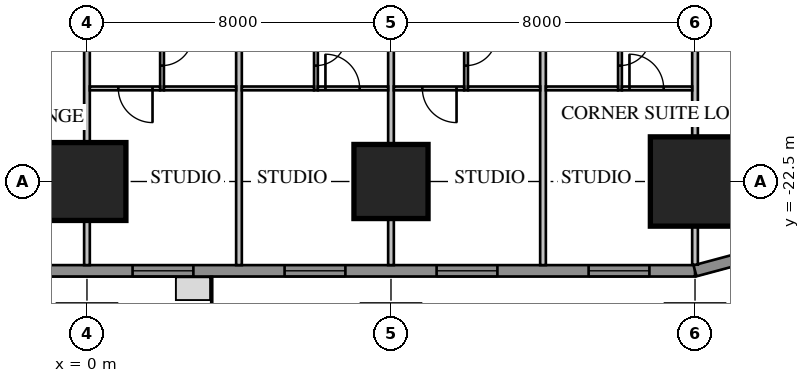
"""IFC4 building model, lengths in metres.
Left out: names, types, materials, properties, quantities, classifications, styles, units other than length and angle.
Written with IfcOpenShell. Run it as: python <this file> out.ifc"""

import sys

from ifc_helpers import new_model, si_unit, direction, frame, frame_2d, origin, origin_2d, place, context, subcontext, project, spatial, rectangle, extrude, element, fill, save


model = new_model("IFC4")
c1 = context("Model", 3, precision=1e-05, world=origin(), true_north=direction((0.0, 1.0)))
c2 = subcontext(c1, "Body", "Model", "MODEL_VIEW")
j1 = project(units=[si_unit("LENGTHUNIT", "METRE"), si_unit("PLANEANGLEUNIT", "RADIAN")], contexts=[c1])
p1 = place(None, origin())
s1 = spatial("IfcSite", under=j1, at=p1, CompositionType="ELEMENT")
p2 = place(p1, origin())
s2 = spatial("IfcBuilding", under=s1, at=p2, CompositionType="ELEMENT")
p3 = place(p2, frame((0.0, 0.0, 35.25)))
s3 = spatial("IfcBuildingStorey", under=s2, at=p3, CompositionType="ELEMENT", Elevation=35.25)
p4 = place(p3, frame((0.0, -22.5, 0.0), z_axis=(0.0, 0.0, 1.0), x_axis=(1.0, 0.0, 0.0)))
e1 = element("IfcColumn", 1, at=p4, inside=s3, PredefinedType="COLUMN", context=c2, shape_type="SweptSolid", body=[
    extrude(rectangle(XDim=2.05, YDim=2.05, at=origin_2d()), origin(), (0.0, 0.0, 1.0), 3.85),
])
p5 = place(p3, frame((8.0, -22.5, 0.0), z_axis=(0.0, 0.0, 1.0), x_axis=(1.0, 0.0, 0.0)))
e2 = element("IfcColumn", 2, at=p5, inside=s3, PredefinedType="COLUMN", context=c2, shape_type="SweptSolid", body=[
    extrude(rectangle(XDim=1.95, YDim=1.95, at=origin_2d()), origin(), (0.0, 0.0, 1.0), 3.85),
])
p6 = place(p3, frame((16.0, -22.5, 0.0), z_axis=(0.0, 0.0, 1.0), x_axis=(1.0, 0.0, 0.0)))
e3 = element("IfcColumn", 3, at=p6, inside=s3, PredefinedType="COLUMN", context=c2, shape_type="SweptSolid", body=[
    extrude(rectangle(XDim=2.35, YDim=2.35, at=origin_2d()), origin(), (0.0, 0.0, 1.0), 3.85),
])
p7 = place(p3, frame((-16.0, -24.85, 0.0), z_axis=(0.0, 0.0, 1.0), x_axis=(1.0, 0.0, 0.0)))
e4 = element("IfcWall", 4, at=p7, inside=s3, PredefinedType="SOLIDWALL", context=c2, shape_type="SweptSolid", body=[
    extrude(rectangle(XDim=32.0, YDim=0.3, at=frame_2d((16.0, 0.0))), origin(), (0.0, 0.0, 1.0), 3.65),
])
p8 = place(p7, frame((1.2, 0.0, 0.75)))
e5 = element("IfcOpeningElement", 5, at=p8, cuts=e4, PredefinedType="OPENING", context=c2, shape_type="SweptSolid", body=[
    extrude(rectangle(XDim=1.6, YDim=1.8, at=frame_2d((0.8, 0.9))), frame((0.0, 0.17, 0.0), z_axis=(0.0, -1.0, 0.0), x_axis=(1.0, 0.0, 0.0)), (0.0, 0.0, 1.0), 0.34),
])
p9 = place(p7, frame((5.2, 0.0, 0.75)))
e6 = element("IfcOpeningElement", 6, at=p9, cuts=e4, PredefinedType="OPENING", context=c2, shape_type="SweptSolid", body=[
    extrude(rectangle(XDim=1.6, YDim=1.8, at=frame_2d((0.8, 0.9))), frame((0.0, 0.17, 0.0), z_axis=(0.0, -1.0, 0.0), x_axis=(1.0, 0.0, 0.0)), (0.0, 0.0, 1.0), 0.34),
])
p10 = place(p7, frame((17.2, 0.0, 0.75)))
e7 = element("IfcOpeningElement", 7, at=p10, cuts=e4, PredefinedType="OPENING", context=c2, shape_type="SweptSolid", body=[
    extrude(rectangle(XDim=1.6, YDim=1.8, at=frame_2d((0.8, 0.9))), frame((0.0, 0.17, 0.0), z_axis=(0.0, -1.0, 0.0), x_axis=(1.0, 0.0, 0.0)), (0.0, 0.0, 1.0), 0.34),
])
p11 = place(p7, frame((21.2, 0.0, 0.75)))
e8 = element("IfcOpeningElement", 8, at=p11, cuts=e4, PredefinedType="OPENING", context=c2, shape_type="SweptSolid", body=[
    extrude(rectangle(XDim=1.6, YDim=1.8, at=frame_2d((0.8, 0.9))), frame((0.0, 0.17, 0.0), z_axis=(0.0, -1.0, 0.0), x_axis=(1.0, 0.0, 0.0)), (0.0, 0.0, 1.0), 0.34),
])
p12 = place(p7, frame((25.2, 0.0, 0.75)))
e9 = element("IfcOpeningElement", 9, at=p12, cuts=e4, PredefinedType="OPENING", context=c2, shape_type="SweptSolid", body=[
    extrude(rectangle(XDim=1.6, YDim=1.8, at=frame_2d((0.8, 0.9))), frame((0.0, 0.17, 0.0), z_axis=(0.0, -1.0, 0.0), x_axis=(1.0, 0.0, 0.0)), (0.0, 0.0, 1.0), 0.34),
])
p13 = place(p7, frame((29.2, 0.0, 0.75)))
e10 = element("IfcOpeningElement", 10, at=p13, cuts=e4, PredefinedType="OPENING", context=c2, shape_type="SweptSolid", body=[
    extrude(rectangle(XDim=1.6, YDim=1.8, at=frame_2d((0.8, 0.9))), frame((0.0, 0.17, 0.0), z_axis=(0.0, -1.0, 0.0), x_axis=(1.0, 0.0, 0.0)), (0.0, 0.0, 1.0), 0.34),
])
p14 = place(p7, frame((8.8, 0.0, 0.75)))
e11 = element("IfcOpeningElement", 11, at=p14, cuts=e4, PredefinedType="OPENING", context=c2, shape_type="SweptSolid", body=[
    extrude(rectangle(XDim=2.4, YDim=1.8, at=frame_2d((1.2, 0.9))), frame((0.0, 0.17, 0.0), z_axis=(0.0, -1.0, 0.0), x_axis=(1.0, 0.0, 0.0)), (0.0, 0.0, 1.0), 0.34),
])
p15 = place(p7, frame((13.812, 0.0, 0.0)))
e12 = element("IfcOpeningElement", 12, at=p15, cuts=e4, PredefinedType="OPENING", context=c2, shape_type="SweptSolid", body=[
    extrude(rectangle(XDim=1.0, YDim=2.4, at=frame_2d((0.5, 1.2))), frame((0.0, 0.17, 0.0), z_axis=(0.0, -1.0, 0.0), x_axis=(1.0, 0.0, 0.0)), (0.0, 0.0, 1.0), 0.34),
])
p16 = place(p3, frame((16.0, -24.85, 0.0), z_axis=(0.0, 0.0, 1.0), x_axis=(0.965920218567, 0.258839972501, 0.0)))
e13 = element("IfcWall", 13, at=p16, inside=s3, PredefinedType="SOLIDWALL", context=c2, shape_type="SweptSolid", body=[
    extrude(rectangle(XDim=4.581, YDim=0.3, at=frame_2d((2.291, 0.0))), origin(), (0.0, 0.0, 1.0), 3.65),
])
p17 = place(p3, frame((0.0, -18.1, 0.0), z_axis=(0.0, 0.0, 1.0), x_axis=(0.0, -1.0, 0.0)))
e14 = element("IfcWall", 14, at=p17, inside=s3, PredefinedType="PARTITIONING", context=c2, shape_type="SweptSolid", body=[
    extrude(rectangle(XDim=6.6, YDim=0.15, at=frame_2d((3.3, 0.0))), origin(), (0.0, 0.0, 1.0), 2.809),
])
for number, where, z_axis, x_axis in (
    (15, (4.0, -18.1, 0.0), (0.0, 0.0, 1.0), (0.0, -1.0, 0.0)),
    (16, (8.0, -18.1, 0.0), (0.0, 0.0, 1.0), (0.0, -1.0, 0.0)),
    (17, (12.0, -18.1, 0.0), (0.0, 0.0, 1.0), (0.0, -1.0, 0.0)),
):
    element("IfcWall", number, at=place(p3, frame(where, z_axis=z_axis, x_axis=x_axis)), inside=s3, PredefinedType="PARTITIONING", context=c2, shape_type="SweptSolid", body=[
        extrude(rectangle(XDim=6.6, YDim=0.15, at=frame_2d((3.3, 0.0))), origin(), (0.0, 0.0, 1.0), 3.65),
    ])
p18 = place(p3, frame((16.0, -18.1, 0.0), z_axis=(0.0, 0.0, 1.0), x_axis=(0.0, -1.0, 0.0)))
e18 = element("IfcWall", 18, at=p18, inside=s3, PredefinedType="PARTITIONING", context=c2, shape_type="SweptSolid", body=[
    extrude(rectangle(XDim=6.589, YDim=0.15, at=frame_2d((3.295, 0.0))), origin(), (0.0, 0.0, 1.0), 3.65),
])
p19 = place(p3, frame((1.975, -18.1, 0.0), z_axis=(0.0, 0.0, 1.0), x_axis=(0.0, -1.0, 0.0)))
e19 = element("IfcWall", 19, at=p19, inside=s3, PredefinedType="PARTITIONING", context=c2, shape_type="SweptSolid", body=[
    extrude(rectangle(XDim=2.0, YDim=0.1, at=frame_2d((1.0, 0.0))), origin(), (0.0, 0.0, 1.0), 3.65),
])
p20 = place(p19, frame((0.55, 0.0, 0.0)))
e20 = element("IfcOpeningElement", 20, at=p20, cuts=e19, PredefinedType="OPENING", context=c2, shape_type="SweptSolid", body=[
    extrude(rectangle(XDim=0.8, YDim=2.1, at=frame_2d((0.4, 1.05))), frame((0.0, 0.07, 0.0), z_axis=(0.0, -1.0, 0.0), x_axis=(1.0, 0.0, 0.0)), (0.0, 0.0, 1.0), 0.14),
])
p21 = place(p3, frame((2.025, -20.05, 0.0), z_axis=(0.0, 0.0, 1.0), x_axis=(1.0, 0.0, 0.0)))
e21 = element("IfcWall", 21, at=p21, inside=s3, PredefinedType="PARTITIONING", context=c2, shape_type="SweptSolid", body=[
    extrude(rectangle(XDim=1.9, YDim=0.1, at=frame_2d((0.95, 0.0))), origin(), (0.0, 0.0, 1.0), 3.65),
])
p22 = place(p3, frame((6.025, -18.1, 0.0), z_axis=(0.0, 0.0, 1.0), x_axis=(0.0, -1.0, 0.0)))
e22 = element("IfcWall", 22, at=p22, inside=s3, PredefinedType="PARTITIONING", context=c2, shape_type="SweptSolid", body=[
    extrude(rectangle(XDim=2.0, YDim=0.1, at=frame_2d((1.0, 0.0))), origin(), (0.0, 0.0, 1.0), 3.65),
])
p23 = place(p22, frame((0.55, 0.0, 0.0)))
e23 = element("IfcOpeningElement", 23, at=p23, cuts=e22, PredefinedType="OPENING", context=c2, shape_type="SweptSolid", body=[
    extrude(rectangle(XDim=0.8, YDim=2.1, at=frame_2d((0.4, 1.05))), frame((0.0, 0.07, 0.0), z_axis=(0.0, -1.0, 0.0), x_axis=(1.0, 0.0, 0.0)), (0.0, 0.0, 1.0), 0.14),
])
p24 = place(p3, frame((4.075, -20.05, 0.0), z_axis=(0.0, 0.0, 1.0), x_axis=(1.0, 0.0, 0.0)))
e24 = element("IfcWall", 24, at=p24, inside=s3, PredefinedType="PARTITIONING", context=c2, shape_type="SweptSolid", body=[
    extrude(rectangle(XDim=1.9, YDim=0.1, at=frame_2d((0.95, 0.0))), origin(), (0.0, 0.0, 1.0), 3.65),
])
p25 = place(p3, frame((9.975, -18.1, 0.0), z_axis=(0.0, 0.0, 1.0), x_axis=(0.0, -1.0, 0.0)))
e25 = element("IfcWall", 25, at=p25, inside=s3, PredefinedType="PARTITIONING", context=c2, shape_type="SweptSolid", body=[
    extrude(rectangle(XDim=2.0, YDim=0.1, at=frame_2d((1.0, 0.0))), origin(), (0.0, 0.0, 1.0), 3.65),
])
p26 = place(p25, frame((0.55, 0.0, 0.0)))
e26 = element("IfcOpeningElement", 26, at=p26, cuts=e25, PredefinedType="OPENING", context=c2, shape_type="SweptSolid", body=[
    extrude(rectangle(XDim=0.8, YDim=2.1, at=frame_2d((0.4, 1.05))), frame((0.0, 0.07, 0.0), z_axis=(0.0, -1.0, 0.0), x_axis=(1.0, 0.0, 0.0)), (0.0, 0.0, 1.0), 0.14),
])
p27 = place(p3, frame((10.025, -20.05, 0.0), z_axis=(0.0, 0.0, 1.0), x_axis=(1.0, 0.0, 0.0)))
e27 = element("IfcWall", 27, at=p27, inside=s3, PredefinedType="PARTITIONING", context=c2, shape_type="SweptSolid", body=[
    extrude(rectangle(XDim=1.9, YDim=0.1, at=frame_2d((0.95, 0.0))), origin(), (0.0, 0.0, 1.0), 3.65),
])
p28 = place(p3, frame((14.025, -18.1, 0.0), z_axis=(0.0, 0.0, 1.0), x_axis=(0.0, -1.0, 0.0)))
e28 = element("IfcWall", 28, at=p28, inside=s3, PredefinedType="PARTITIONING", context=c2, shape_type="SweptSolid", body=[
    extrude(rectangle(XDim=2.0, YDim=0.1, at=frame_2d((1.0, 0.0))), origin(), (0.0, 0.0, 1.0), 3.65),
])
p29 = place(p28, frame((0.55, 0.0, 0.0)))
e29 = element("IfcOpeningElement", 29, at=p29, cuts=e28, PredefinedType="OPENING", context=c2, shape_type="SweptSolid", body=[
    extrude(rectangle(XDim=0.8, YDim=2.1, at=frame_2d((0.4, 1.05))), frame((0.0, 0.07, 0.0), z_axis=(0.0, -1.0, 0.0), x_axis=(1.0, 0.0, 0.0)), (0.0, 0.0, 1.0), 0.14),
])
p30 = place(p3, frame((12.075, -20.05, 0.0), z_axis=(0.0, 0.0, 1.0), x_axis=(1.0, 0.0, 0.0)))
e30 = element("IfcWall", 30, at=p30, inside=s3, PredefinedType="PARTITIONING", context=c2, shape_type="SweptSolid", body=[
    extrude(rectangle(XDim=1.9, YDim=0.1, at=frame_2d((0.95, 0.0))), origin(), (0.0, 0.0, 1.0), 3.65),
])
p31 = place(p3, frame((0.075, -20.05, 0.0), z_axis=(0.0, 0.0, 1.0), x_axis=(1.0, 0.0, 0.0)))
e31 = element("IfcWall", 31, at=p31, inside=s3, PredefinedType="PARTITIONING", context=c2, shape_type="SweptSolid", body=[
    extrude(rectangle(XDim=1.85, YDim=0.1, at=frame_2d((0.925, 0.0))), origin(), (0.0, 0.0, 1.0), 3.65),
])
p32 = place(p31, frame((0.75, 0.0, 0.0)))
e32 = element("IfcOpeningElement", 32, at=p32, cuts=e31, PredefinedType="OPENING", context=c2, shape_type="SweptSolid", body=[
    extrude(rectangle(XDim=0.9, YDim=2.1, at=frame_2d((0.45, 1.05))), frame((0.0, 0.07, 0.0), z_axis=(0.0, -1.0, 0.0), x_axis=(1.0, 0.0, 0.0)), (0.0, 0.0, 1.0), 0.14),
])
p33 = place(p3, frame((6.075, -20.05, 0.0), z_axis=(0.0, 0.0, 1.0), x_axis=(1.0, 0.0, 0.0)))
e33 = element("IfcWall", 33, at=p33, inside=s3, PredefinedType="PARTITIONING", context=c2, shape_type="SweptSolid", body=[
    extrude(rectangle(XDim=1.85, YDim=0.1, at=frame_2d((0.925, 0.0))), origin(), (0.0, 0.0, 1.0), 3.65),
])
p34 = place(p33, frame((0.2, 0.0, 0.0)))
e34 = element("IfcOpeningElement", 34, at=p34, cuts=e33, PredefinedType="OPENING", context=c2, shape_type="SweptSolid", body=[
    extrude(rectangle(XDim=0.9, YDim=2.1, at=frame_2d((0.45, 1.05))), frame((0.0, 0.07, 0.0), z_axis=(0.0, -1.0, 0.0), x_axis=(1.0, 0.0, 0.0)), (0.0, 0.0, 1.0), 0.14),
])
p35 = place(p3, frame((8.075, -20.05, 0.0), z_axis=(0.0, 0.0, 1.0), x_axis=(1.0, 0.0, 0.0)))
e35 = element("IfcWall", 35, at=p35, inside=s3, PredefinedType="PARTITIONING", context=c2, shape_type="SweptSolid", body=[
    extrude(rectangle(XDim=1.85, YDim=0.1, at=frame_2d((0.925, 0.0))), origin(), (0.0, 0.0, 1.0), 3.65),
])
p36 = place(p35, frame((0.75, 0.0, 0.0)))
e36 = element("IfcOpeningElement", 36, at=p36, cuts=e35, PredefinedType="OPENING", context=c2, shape_type="SweptSolid", body=[
    extrude(rectangle(XDim=0.9, YDim=2.1, at=frame_2d((0.45, 1.05))), frame((0.0, 0.07, 0.0), z_axis=(0.0, -1.0, 0.0), x_axis=(1.0, 0.0, 0.0)), (0.0, 0.0, 1.0), 0.14),
])
p37 = place(p3, frame((14.075, -20.05, 0.0), z_axis=(0.0, 0.0, 1.0), x_axis=(1.0, 0.0, 0.0)))
e37 = element("IfcWall", 37, at=p37, inside=s3, PredefinedType="PARTITIONING", context=c2, shape_type="SweptSolid", body=[
    extrude(rectangle(XDim=1.85, YDim=0.1, at=frame_2d((0.925, 0.0))), origin(), (0.0, 0.0, 1.0), 3.65),
])
p38 = place(p37, frame((0.2, 0.0, 0.0)))
e38 = element("IfcOpeningElement", 38, at=p38, cuts=e37, PredefinedType="OPENING", context=c2, shape_type="SweptSolid", body=[
    extrude(rectangle(XDim=0.9, YDim=2.1, at=frame_2d((0.45, 1.05))), frame((0.0, 0.07, 0.0), z_axis=(0.0, -1.0, 0.0), x_axis=(1.0, 0.0, 0.0)), (0.0, 0.0, 1.0), 0.14),
])
p39 = place(p10, origin())
e39 = element("IfcWindow", 39, at=p39, inside=s3, PartitioningType="SINGLE_PANEL", PredefinedType="WINDOW", context=c2, shape_type="SweptSolid", body=[
    extrude(rectangle(XDim=1.6, YDim=1.8, at=frame_2d((0.8, 0.9))), frame((0.0, 0.03, 0.0), z_axis=(0.0, -1.0, 0.0), x_axis=(1.0, 0.0, 0.0)), (0.0, 0.0, 1.0), 0.06),
])
fill(e7, e39)
p40 = place(p11, origin())
e40 = element("IfcWindow", 40, at=p40, inside=s3, PartitioningType="SINGLE_PANEL", PredefinedType="WINDOW", context=c2, shape_type="SweptSolid", body=[
    extrude(rectangle(XDim=1.6, YDim=1.8, at=frame_2d((0.8, 0.9))), frame((0.0, 0.03, 0.0), z_axis=(0.0, -1.0, 0.0), x_axis=(1.0, 0.0, 0.0)), (0.0, 0.0, 1.0), 0.06),
])
fill(e8, e40)
p41 = place(p12, origin())
e41 = element("IfcWindow", 41, at=p41, inside=s3, PartitioningType="SINGLE_PANEL", PredefinedType="WINDOW", context=c2, shape_type="SweptSolid", body=[
    extrude(rectangle(XDim=1.6, YDim=1.8, at=frame_2d((0.8, 0.9))), frame((0.0, 0.03, 0.0), z_axis=(0.0, -1.0, 0.0), x_axis=(1.0, 0.0, 0.0)), (0.0, 0.0, 1.0), 0.06),
])
fill(e9, e41)
p42 = place(p13, origin())
e42 = element("IfcWindow", 42, at=p42, inside=s3, PartitioningType="SINGLE_PANEL", PredefinedType="WINDOW", context=c2, shape_type="SweptSolid", body=[
    extrude(rectangle(XDim=1.6, YDim=1.8, at=frame_2d((0.8, 0.9))), frame((0.0, 0.03, 0.0), z_axis=(0.0, -1.0, 0.0), x_axis=(1.0, 0.0, 0.0)), (0.0, 0.0, 1.0), 0.06),
])
fill(e10, e42)
p43 = place(p20, origin())
e43 = element("IfcDoor", 43, at=p43, inside=s3, OperationType="SINGLE_SWING_LEFT", PredefinedType="DOOR", context=c2, shape_type="SweptSolid", body=[
    extrude(rectangle(XDim=0.8, YDim=2.1, at=frame_2d((0.4, 1.05))), frame((0.0, 0.025, 0.0), z_axis=(0.0, -1.0, 0.0), x_axis=(1.0, 0.0, 0.0)), (0.0, 0.0, 1.0), 0.05),
])
fill(e20, e43)
p44 = place(p23, origin())
e44 = element("IfcDoor", 44, at=p44, inside=s3, OperationType="SINGLE_SWING_LEFT", PredefinedType="DOOR", context=c2, shape_type="SweptSolid", body=[
    extrude(rectangle(XDim=0.8, YDim=2.1, at=frame_2d((0.4, 1.05))), frame((0.0, 0.025, 0.0), z_axis=(0.0, -1.0, 0.0), x_axis=(1.0, 0.0, 0.0)), (0.0, 0.0, 1.0), 0.05),
])
fill(e23, e44)
p45 = place(p26, origin())
e45 = element("IfcDoor", 45, at=p45, inside=s3, OperationType="SINGLE_SWING_LEFT", PredefinedType="DOOR", context=c2, shape_type="SweptSolid", body=[
    extrude(rectangle(XDim=0.8, YDim=2.1, at=frame_2d((0.4, 1.05))), frame((0.0, 0.025, 0.0), z_axis=(0.0, -1.0, 0.0), x_axis=(1.0, 0.0, 0.0)), (0.0, 0.0, 1.0), 0.05),
])
fill(e26, e45)
p46 = place(p29, origin())
e46 = element("IfcDoor", 46, at=p46, inside=s3, OperationType="SINGLE_SWING_LEFT", PredefinedType="DOOR", context=c2, shape_type="SweptSolid", body=[
    extrude(rectangle(XDim=0.8, YDim=2.1, at=frame_2d((0.4, 1.05))), frame((0.0, 0.025, 0.0), z_axis=(0.0, -1.0, 0.0), x_axis=(1.0, 0.0, 0.0)), (0.0, 0.0, 1.0), 0.05),
])
fill(e29, e46)
p47 = place(p32, origin())
e47 = element("IfcDoor", 47, at=p47, inside=s3, OperationType="SINGLE_SWING_RIGHT", PredefinedType="DOOR", context=c2, shape_type="SweptSolid", body=[
    extrude(rectangle(XDim=0.9, YDim=2.1, at=frame_2d((0.45, 1.05))), frame((0.0, 0.025, 0.0), z_axis=(0.0, -1.0, 0.0), x_axis=(1.0, 0.0, 0.0)), (0.0, 0.0, 1.0), 0.05),
])
fill(e32, e47)
p48 = place(p34, origin())
e48 = element("IfcDoor", 48, at=p48, inside=s3, OperationType="SINGLE_SWING_LEFT", PredefinedType="DOOR", context=c2, shape_type="SweptSolid", body=[
    extrude(rectangle(XDim=0.9, YDim=2.1, at=frame_2d((0.45, 1.05))), frame((0.0, 0.025, 0.0), z_axis=(0.0, -1.0, 0.0), x_axis=(1.0, 0.0, 0.0)), (0.0, 0.0, 1.0), 0.05),
])
fill(e34, e48)
p49 = place(p36, origin())
e49 = element("IfcDoor", 49, at=p49, inside=s3, OperationType="SINGLE_SWING_RIGHT", PredefinedType="DOOR", context=c2, shape_type="SweptSolid", body=[
    extrude(rectangle(XDim=0.9, YDim=2.1, at=frame_2d((0.45, 1.05))), frame((0.0, 0.025, 0.0), z_axis=(0.0, -1.0, 0.0), x_axis=(1.0, 0.0, 0.0)), (0.0, 0.0, 1.0), 0.05),
])
fill(e36, e49)
p50 = place(p38, origin())
e50 = element("IfcDoor", 50, at=p50, inside=s3, OperationType="SINGLE_SWING_LEFT", PredefinedType="DOOR", context=c2, shape_type="SweptSolid", body=[
    extrude(rectangle(XDim=0.9, YDim=2.1, at=frame_2d((0.45, 1.05))), frame((0.0, 0.025, 0.0), z_axis=(0.0, -1.0, 0.0), x_axis=(1.0, 0.0, 0.0)), (0.0, 0.0, 1.0), 0.05),
])
fill(e38, e50)
save(model, sys.argv[1])
